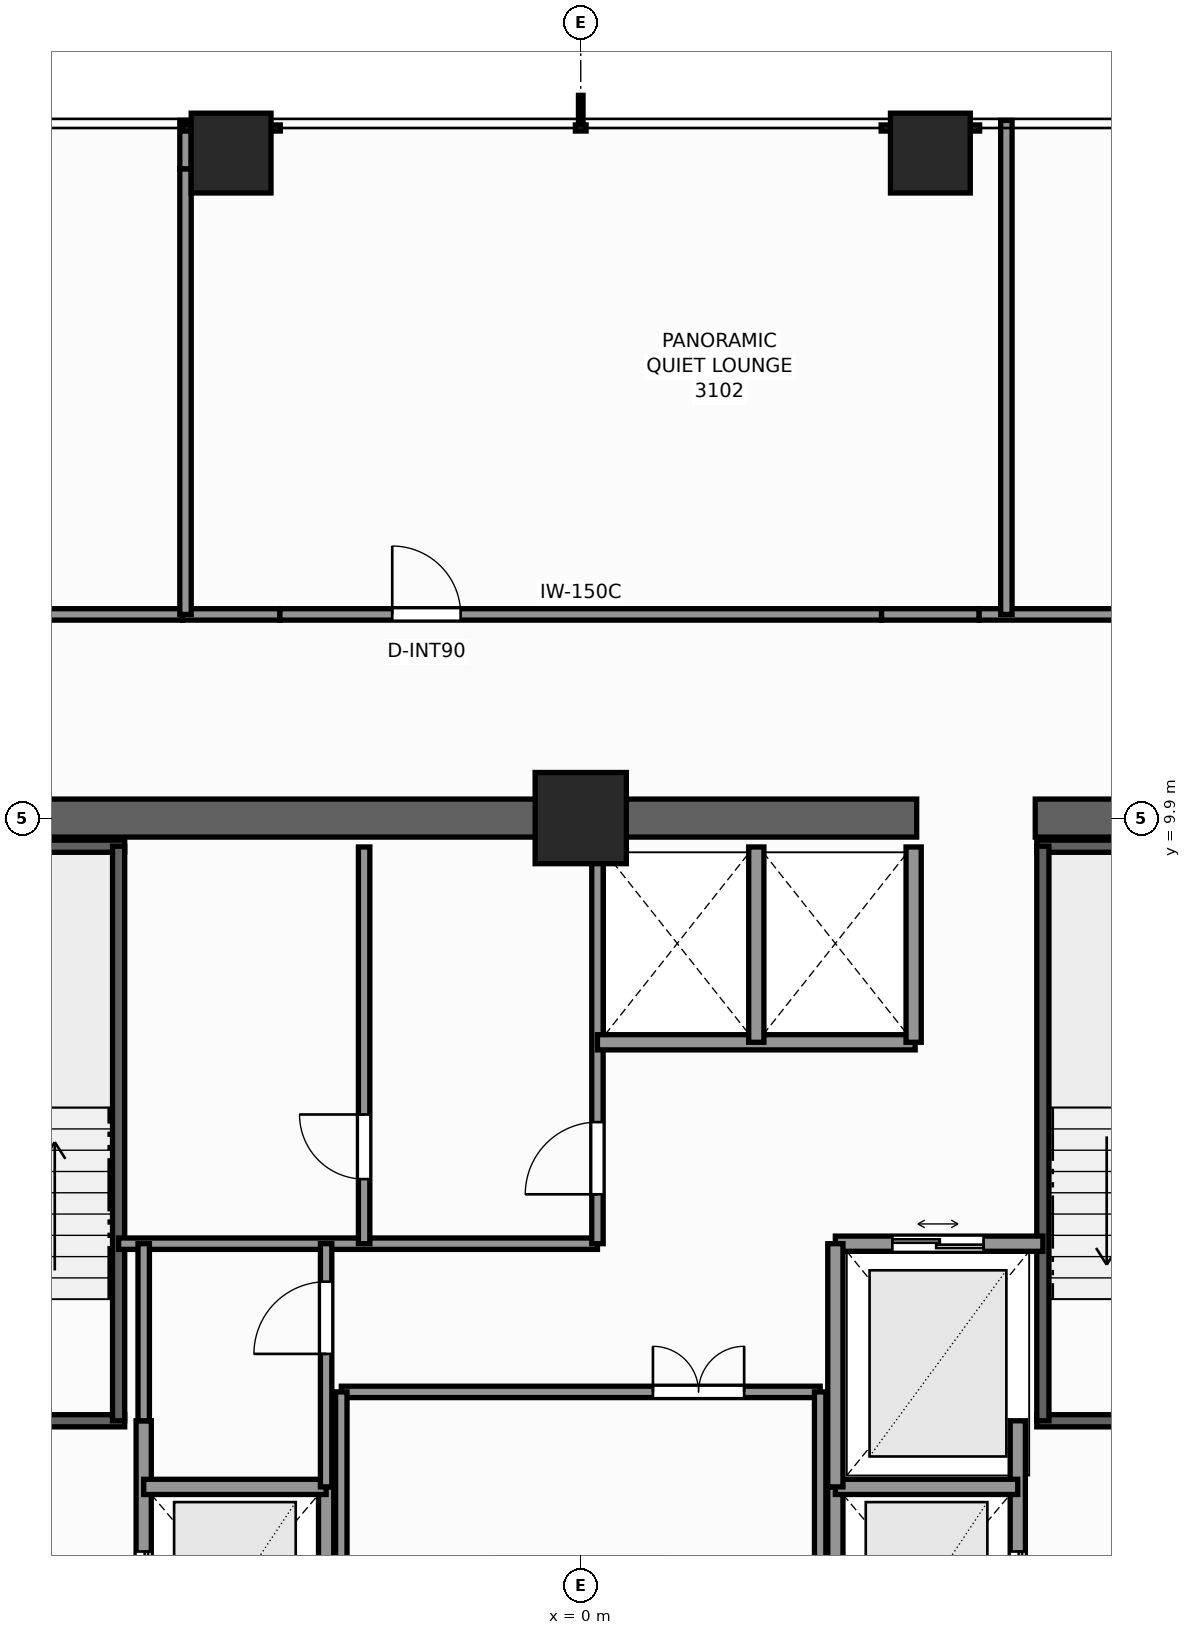
"""IFC4 building model, lengths in metres.
Left out: names, types, materials, properties, quantities, classifications, styles, units other than length and angle.
Written with IfcOpenShell. Run it as: python <this file> out.ifc"""

import sys

from ifc_helpers import new_model, si_unit, direction, frame, frame_2d, origin, origin_2d, place, context, subcontext, project, spatial, rectangle, extrude, element, fill, save


model = new_model("IFC4")
c1 = context("Model", 3, precision=1e-05, world=origin(), true_north=direction((0.0, 1.0)))
c2 = subcontext(c1, "Body", "Model", "MODEL_VIEW")
j1 = project(units=[si_unit("LENGTHUNIT", "METRE"), si_unit("PLANEANGLEUNIT", "RADIAN")], contexts=[c1])
p1 = place(None, origin())
s1 = spatial("IfcSite", under=j1, at=p1, CompositionType="ELEMENT")
p2 = place(p1, origin())
s2 = spatial("IfcBuilding", under=s1, at=p2, CompositionType="ELEMENT")
p3 = place(p2, frame((0.0, 0.0, 108.5)))
s3 = spatial("IfcBuildingStorey", under=s2, at=p3, CompositionType="ELEMENT", Elevation=108.5)
p4 = place(p3, frame((-10.15, 9.9, 0.0), z_axis=(0.0, 0.0, 1.0), x_axis=(1.0, 0.0, 0.0)))
e1 = element("IfcWall", 1, at=p4, inside=s3, PredefinedType="SHEAR", context=c2, shape_type="SweptSolid", body=[
    extrude(rectangle(XDim=14.57, YDim=0.5, at=frame_2d((7.285, 0.0))), origin(), (0.0, 0.0, 1.0), 3.3),
])
p5 = place(p3, frame((5.98, 9.9, 0.0), z_axis=(0.0, 0.0, 1.0), x_axis=(1.0, 0.0, 0.0)))
e2 = element("IfcWall", 2, at=p5, inside=s3, PredefinedType="SHEAR", context=c2, shape_type="SweptSolid", body=[
    extrude(rectangle(XDim=4.17, YDim=0.5, at=frame_2d((2.085, 0.0))), origin(), (0.0, 0.0, 1.0), 3.3),
])
p6 = place(p3, frame((0.0, 9.9, 0.0), z_axis=(0.0, 0.0, 1.0), x_axis=(1.0, 0.0, 0.0)))
e3 = element("IfcColumn", 3, at=p6, inside=s3, PredefinedType="COLUMN", context=c2, shape_type="SweptSolid", body=[
    extrude(rectangle(XDim=1.2, YDim=1.2, at=origin_2d()), origin(), (0.0, 0.0, 1.0), 3.3),
])
for number, where, z_axis, x_axis in (
    (4, (-4.6, 18.65, 0.0), (0.0, 0.0, 1.0), (1.0, 0.0, 0.0)),
    (5, (4.6, 18.65, 0.0), (0.0, 0.0, 1.0), (1.0, 0.0, 0.0)),
):
    element("IfcColumn", number, at=place(p3, frame(where, z_axis=z_axis, x_axis=x_axis)), inside=s3, PredefinedType="COLUMN", context=c2, shape_type="SweptSolid", body=[
        extrude(rectangle(XDim=1.05, YDim=1.05, at=origin_2d()), origin(), (0.0, 0.0, 1.0), 3.3),
    ])
p7 = place(p3, frame((-9.52, 1.97, 0.0), z_axis=(0.0, 0.0, 1.0), x_axis=(1.0, 0.0, 0.0)))
e6 = element("IfcWall", 6, at=p7, inside=s3, PredefinedType="SHEAR", context=c2, shape_type="SweptSolid", body=[
    extrude(rectangle(XDim=3.52, YDim=0.16, at=frame_2d((1.76, 0.0))), origin(), (0.0, 0.0, 1.0), 3.3),
])
p8 = place(p7, frame((1.15, 0.0, 0.0)))
e7 = element("IfcOpeningElement", 7, at=p8, cuts=e6, PredefinedType="OPENING", context=c2, shape_type="SweptSolid", body=[
    extrude(rectangle(XDim=1.1, YDim=2.2, at=frame_2d((0.55, 1.1))), frame((0.0, 0.09, 0.0), z_axis=(0.0, -1.0, 0.0), x_axis=(1.0, 0.0, 0.0)), (0.0, 0.0, 1.0), 0.18),
])
p9 = place(p3, frame((-9.52, 9.53, 0.0), z_axis=(0.0, 0.0, 1.0), x_axis=(1.0, 0.0, 0.0)))
e8 = element("IfcWall", 8, at=p9, inside=s3, PredefinedType="SHEAR", context=c2, shape_type="SweptSolid", body=[
    extrude(rectangle(XDim=3.52, YDim=0.16, at=frame_2d((1.76, 0.0))), origin(), (0.0, 0.0, 1.0), 3.3),
])
p10 = place(p3, frame((-6.08, 1.97, 0.0), z_axis=(0.0, 0.0, 1.0), x_axis=(0.0, 1.0, 0.0)))
e9 = element("IfcWall", 9, at=p10, inside=s3, PredefinedType="SHEAR", context=c2, shape_type="SweptSolid", body=[
    extrude(rectangle(XDim=7.56, YDim=0.16, at=frame_2d((3.78, 0.0))), origin(), (0.0, 0.0, 1.0), 3.3),
])
p11 = place(p3, frame((6.0, 1.97, 0.0), z_axis=(0.0, 0.0, 1.0), x_axis=(1.0, 0.0, 0.0)))
e10 = element("IfcWall", 10, at=p11, inside=s3, PredefinedType="SHEAR", context=c2, shape_type="SweptSolid", body=[
    extrude(rectangle(XDim=3.52, YDim=0.16, at=frame_2d((1.76, 0.0))), origin(), (0.0, 0.0, 1.0), 3.3),
])
p12 = place(p11, frame((1.15, 0.0, 0.0)))
e11 = element("IfcOpeningElement", 11, at=p12, cuts=e10, PredefinedType="OPENING", context=c2, shape_type="SweptSolid", body=[
    extrude(rectangle(XDim=1.1, YDim=2.2, at=frame_2d((0.55, 1.1))), frame((0.0, 0.09, 0.0), z_axis=(0.0, -1.0, 0.0), x_axis=(1.0, 0.0, 0.0)), (0.0, 0.0, 1.0), 0.18),
])
p13 = place(p3, frame((6.0, 9.53, 0.0), z_axis=(0.0, 0.0, 1.0), x_axis=(1.0, 0.0, 0.0)))
e12 = element("IfcWall", 12, at=p13, inside=s3, PredefinedType="SHEAR", context=c2, shape_type="SweptSolid", body=[
    extrude(rectangle(XDim=3.52, YDim=0.16, at=frame_2d((1.76, 0.0))), origin(), (0.0, 0.0, 1.0), 3.3),
])
p14 = place(p3, frame((6.08, 1.97, 0.0), z_axis=(0.0, 0.0, 1.0), x_axis=(0.0, 1.0, 0.0)))
e13 = element("IfcWall", 13, at=p14, inside=s3, PredefinedType="SHEAR", context=c2, shape_type="SweptSolid", body=[
    extrude(rectangle(XDim=7.56, YDim=0.16, at=frame_2d((3.78, 0.0))), origin(), (0.0, 0.0, 1.0), 3.3),
])
p15 = place(p3, frame((-5.75, -3.6, 0.0), z_axis=(0.0, 0.0, 1.0), x_axis=(0.0, 1.0, 0.0)))
e14 = element("IfcWall", 14, at=p15, inside=s3, PredefinedType="SOLIDWALL", context=c2, shape_type="SweptSolid", body=[
    extrude(rectangle(XDim=5.57, YDim=0.2, at=frame_2d((2.785, 0.0))), origin(), (0.0, 0.0, 1.0), 2.715),
])
p16 = place(p15, frame((2.75, 0.0, 0.0)))
e15 = element("IfcOpeningElement", 15, at=p16, cuts=e14, PredefinedType="OPENING", context=c2, shape_type="SweptSolid", body=[
    extrude(rectangle(XDim=1.1, YDim=2.2, at=frame_2d((0.55, 1.1))), frame((0.0, 0.11, 0.0), z_axis=(0.0, -1.0, 0.0), x_axis=(1.0, 0.0, 0.0)), (0.0, 0.0, 1.0), 0.22),
])
p17 = place(p3, frame((-3.35, -1.7, 0.0), z_axis=(0.0, 0.0, 1.0), x_axis=(0.0, 1.0, 0.0)))
e16 = element("IfcWall", 16, at=p17, inside=s3, PredefinedType="SOLIDWALL", context=c2, shape_type="SweptSolid", body=[
    extrude(rectangle(XDim=2.8, YDim=0.2, at=frame_2d((1.4, 0.0))), origin(), (0.0, 0.0, 1.0), 2.715),
])
p18 = place(p3, frame((-5.75, 1.1, 0.0), z_axis=(0.0, 0.0, 1.0), x_axis=(1.0, 0.0, 0.0)))
e17 = element("IfcWall", 17, at=p18, inside=s3, PredefinedType="SOLIDWALL", context=c2, shape_type="SweptSolid", body=[
    extrude(rectangle(XDim=2.4, YDim=0.2, at=frame_2d((1.2, 0.0))), origin(), (0.0, 0.0, 1.0), 3.08),
])
p19 = place(p3, frame((5.75, -3.6, 0.0), z_axis=(0.0, 0.0, 1.0), x_axis=(0.0, 1.0, 0.0)))
e18 = element("IfcWall", 18, at=p19, inside=s3, PredefinedType="SOLIDWALL", context=c2, shape_type="SweptSolid", body=[
    extrude(rectangle(XDim=5.57, YDim=0.2, at=frame_2d((2.785, 0.0))), origin(), (0.0, 0.0, 1.0), 2.715),
])
p20 = place(p19, frame((2.75, 0.0, 0.0)))
e19 = element("IfcOpeningElement", 19, at=p20, cuts=e18, PredefinedType="OPENING", context=c2, shape_type="SweptSolid", body=[
    extrude(rectangle(XDim=1.1, YDim=2.2, at=frame_2d((0.55, 1.1))), frame((0.0, 0.11, 0.0), z_axis=(0.0, -1.0, 0.0), x_axis=(1.0, 0.0, 0.0)), (0.0, 0.0, 1.0), 0.22),
])
p21 = place(p3, frame((3.35, -1.7, 0.0), z_axis=(0.0, 0.0, 1.0), x_axis=(0.0, 1.0, 0.0)))
e20 = element("IfcWall", 20, at=p21, inside=s3, PredefinedType="SOLIDWALL", context=c2, shape_type="SweptSolid", body=[
    extrude(rectangle(XDim=2.8, YDim=0.2, at=frame_2d((1.4, 0.0))), origin(), (0.0, 0.0, 1.0), 2.715),
])
p22 = place(p3, frame((3.35, 1.1, 0.0), z_axis=(0.0, 0.0, 1.0), x_axis=(1.0, 0.0, 0.0)))
e21 = element("IfcWall", 21, at=p22, inside=s3, PredefinedType="SOLIDWALL", context=c2, shape_type="SweptSolid", body=[
    extrude(rectangle(XDim=2.4, YDim=0.2, at=frame_2d((1.2, 0.0))), origin(), (0.0, 0.0, 1.0), 3.08),
])
p23 = place(p3, frame((3.35, 4.3, 0.0), z_axis=(0.0, 0.0, 1.0), x_axis=(1.0, 0.0, 0.0)))
e22 = element("IfcWall", 22, at=p23, inside=s3, PredefinedType="SOLIDWALL", context=c2, shape_type="SweptSolid", body=[
    extrude(rectangle(XDim=2.73, YDim=0.2, at=frame_2d((1.365, 0.0))), origin(), (0.0, 0.0, 1.0), 3.08),
])
p24 = place(p23, frame((0.75, 0.0, 0.0)))
e23 = element("IfcOpeningElement", 23, at=p24, cuts=e22, PredefinedType="OPENING", context=c2, shape_type="SweptSolid", body=[
    extrude(rectangle(XDim=1.2, YDim=2.25, at=frame_2d((0.6, 1.125))), frame((0.0, 0.11, 0.0), z_axis=(0.0, -1.0, 0.0), x_axis=(1.0, 0.0, 0.0)), (0.0, 0.0, 1.0), 0.22),
])
p25 = place(p3, frame((3.35, 1.1, 0.0), z_axis=(0.0, 0.0, 1.0), x_axis=(0.0, 1.0, 0.0)))
e24 = element("IfcWall", 24, at=p25, inside=s3, PredefinedType="SOLIDWALL", context=c2, shape_type="SweptSolid", body=[
    extrude(rectangle(XDim=3.2, YDim=0.2, at=frame_2d((1.6, 0.0))), origin(), (0.0, 0.0, 1.0), 2.715),
])
p26 = place(p3, frame((-6.08, 4.3, 0.0), z_axis=(0.0, 0.0, 1.0), x_axis=(1.0, 0.0, 0.0)))
e25 = element("IfcWall", 25, at=p26, inside=s3, PredefinedType="PARTITIONING", context=c2, shape_type="SweptSolid", body=[
    extrude(rectangle(XDim=6.3, YDim=0.15, at=frame_2d((3.15, 0.0))), origin(), (0.0, 0.0, 1.0), 3.08),
])
p27 = place(p3, frame((0.22, 4.3, 0.0), z_axis=(0.0, 0.0, 1.0), x_axis=(0.0, 1.0, 0.0)))
e26 = element("IfcWall", 26, at=p27, inside=s3, PredefinedType="PARTITIONING", context=c2, shape_type="SweptSolid", body=[
    extrude(rectangle(XDim=5.22, YDim=0.15, at=frame_2d((2.61, 0.0))), origin(), (0.0, 0.0, 1.0), 3.08),
])
p28 = place(p27, frame((0.65, 0.0, 0.0)))
e27 = element("IfcOpeningElement", 27, at=p28, cuts=e26, PredefinedType="OPENING", context=c2, shape_type="SweptSolid", body=[
    extrude(rectangle(XDim=0.95, YDim=2.06, at=frame_2d((0.475, 1.03))), frame((0.0, 0.085, 0.0), z_axis=(0.0, -1.0, 0.0), x_axis=(1.0, 0.0, 0.0)), (0.0, 0.0, 1.0), 0.17),
])
p29 = place(p3, frame((-2.85, 4.3, 0.0), z_axis=(0.0, 0.0, 1.0), x_axis=(0.0, 1.0, 0.0)))
e28 = element("IfcWall", 28, at=p29, inside=s3, PredefinedType="PARTITIONING", context=c2, shape_type="SweptSolid", body=[
    extrude(rectangle(XDim=5.22, YDim=0.15, at=frame_2d((2.61, 0.0))), origin(), (0.0, 0.0, 1.0), 3.08),
])
p30 = place(p29, frame((0.85, 0.0, 0.0)))
e29 = element("IfcOpeningElement", 29, at=p30, cuts=e28, PredefinedType="OPENING", context=c2, shape_type="SweptSolid", body=[
    extrude(rectangle(XDim=0.85, YDim=2.03, at=frame_2d((0.425, 1.015))), frame((0.0, 0.085, 0.0), z_axis=(0.0, -1.0, 0.0), x_axis=(1.0, 0.0, 0.0)), (0.0, 0.0, 1.0), 0.17),
])
p31 = place(p3, frame((0.22, 6.95, 0.0), z_axis=(0.0, 0.0, 1.0), x_axis=(1.0, 0.0, 0.0)))
e30 = element("IfcWall", 30, at=p31, inside=s3, PredefinedType="SOLIDWALL", context=c2, shape_type="SweptSolid", body=[
    extrude(rectangle(XDim=4.18, YDim=0.2, at=frame_2d((2.09, 0.0))), origin(), (0.0, 0.0, 1.0), 3.08),
])
for number, where, z_axis, x_axis in (
    (31, (4.38, 6.95, 0.0), (0.0, 0.0, 1.0), (0.0, 1.0, 0.0)),
    (32, (2.31, 6.95, 0.0), (0.0, 0.0, 1.0), (0.0, 1.0, 0.0)),
):
    element("IfcWall", number, at=place(p3, frame(where, z_axis=z_axis, x_axis=x_axis)), inside=s3, PredefinedType="SOLIDWALL", context=c2, shape_type="SweptSolid", body=[
        extrude(rectangle(XDim=2.57, YDim=0.2, at=frame_2d((1.285, 0.0))), origin(), (0.0, 0.0, 1.0), 3.08),
    ])
p32 = place(p3, frame((-3.15, 2.35, 0.0), z_axis=(0.0, 0.0, 1.0), x_axis=(1.0, 0.0, 0.0)))
e33 = element("IfcWall", 33, at=p32, inside=s3, PredefinedType="PARTITIONING", context=c2, shape_type="SweptSolid", body=[
    extrude(rectangle(XDim=6.3, YDim=0.15, at=frame_2d((3.15, 0.0))), origin(), (0.0, 0.0, 1.0), 2.715),
])
p33 = place(p32, frame((4.1, 0.0, 0.0)))
e34 = element("IfcOpeningElement", 34, at=p33, cuts=e33, PredefinedType="OPENING", context=c2, shape_type="SweptSolid", body=[
    extrude(rectangle(XDim=1.2, YDim=2.2, at=frame_2d((0.6, 1.1))), frame((0.0, 0.085, 0.0), z_axis=(0.0, -1.0, 0.0), x_axis=(1.0, 0.0, 0.0)), (0.0, 0.0, 1.0), 0.17),
])
for number, where, z_axis, x_axis in (
    (35, (-3.15, -1.95, 0.0), (0.0, 0.0, 1.0), (0.0, 1.0, 0.0)),
    (36, (3.15, -1.95, 0.0), (0.0, 0.0, 1.0), (0.0, 1.0, 0.0)),
):
    element("IfcWall", number, at=place(p3, frame(where, z_axis=z_axis, x_axis=x_axis)), inside=s3, PredefinedType="PARTITIONING", context=c2, shape_type="SweptSolid", body=[
        extrude(rectangle(XDim=4.3, YDim=0.15, at=frame_2d((2.15, 0.0))), origin(), (0.0, 0.0, 1.0), 2.715),
    ])
p34 = place(p3, frame((-3.35, 1.1, 0.0), z_axis=(0.0, 0.0, 1.0), x_axis=(0.0, 1.0, 0.0)))
e37 = element("IfcWall", 37, at=p34, inside=s3, PredefinedType="PARTITIONING", context=c2, shape_type="SweptSolid", body=[
    extrude(rectangle(XDim=3.2, YDim=0.15, at=frame_2d((1.6, 0.0))), origin(), (0.0, 0.0, 1.0), 2.715),
])
p35 = place(p34, frame((1.75, 0.0, 0.0)))
e38 = element("IfcOpeningElement", 38, at=p35, cuts=e37, PredefinedType="OPENING", context=c2, shape_type="SweptSolid", body=[
    extrude(rectangle(XDim=0.95, YDim=2.06, at=frame_2d((0.475, 1.03))), frame((0.0, 0.085, 0.0), z_axis=(0.0, -1.0, 0.0), x_axis=(1.0, 0.0, 0.0)), (0.0, 0.0, 1.0), 0.17),
])
p36 = place(p3, frame((-5.75, 1.97, 0.0), z_axis=(0.0, 0.0, 1.0), x_axis=(0.0, 1.0, 0.0)))
e39 = element("IfcWall", 39, at=p36, inside=s3, PredefinedType="PARTITIONING", context=c2, shape_type="SweptSolid", body=[
    extrude(rectangle(XDim=2.33, YDim=0.15, at=frame_2d((1.165, 0.0))), origin(), (0.0, 0.0, 1.0), 2.715),
])
p37 = place(p3, frame((-10.016, 12.58, 0.0), z_axis=(0.0, 0.0, 1.0), x_axis=(1.0, 0.0, 0.0)))
e40 = element("IfcWall", 40, at=p37, inside=s3, PredefinedType="PARTITIONING", context=c2, shape_type="SweptSolid", body=[
    extrude(rectangle(XDim=4.774, YDim=0.15, at=frame_2d((2.387, 0.0))), origin(), (0.0, 0.0, 1.0), 3.08),
])
p38 = place(p37, frame((2.031, 0.0, 0.0)))
e41 = element("IfcOpeningElement", 41, at=p38, cuts=e40, PredefinedType="OPENING", context=c2, shape_type="SweptSolid", body=[
    extrude(rectangle(XDim=0.9, YDim=2.06, at=frame_2d((0.45, 1.03))), frame((0.0, 0.085, 0.0), z_axis=(0.0, -1.0, 0.0), x_axis=(1.0, 0.0, 0.0)), (0.0, 0.0, 1.0), 0.17),
])
p39 = place(p3, frame((-5.242, 12.58, 0.0), z_axis=(0.0, 0.0, 1.0), x_axis=(1.0, 0.0, 0.0)))
e42 = element("IfcWall", 42, at=p39, inside=s3, PredefinedType="PARTITIONING", context=c2, shape_type="SweptSolid", body=[
    extrude(rectangle(XDim=1.284, YDim=0.15, at=frame_2d((0.642, 0.0))), origin(), (0.0, 0.0, 1.0), 1.265),
])
p40 = place(p3, frame((-3.958, 12.58, 0.0), z_axis=(0.0, 0.0, 1.0), x_axis=(1.0, 0.0, 0.0)))
e43 = element("IfcWall", 43, at=p40, inside=s3, PredefinedType="PARTITIONING", context=c2, shape_type="SweptSolid", body=[
    extrude(rectangle(XDim=7.916, YDim=0.15, at=frame_2d((3.958, 0.0))), origin(), (0.0, 0.0, 1.0), 2.369),
])
p41 = place(p40, frame((1.478, 0.0, 0.0)))
e44 = element("IfcOpeningElement", 44, at=p41, cuts=e43, PredefinedType="OPENING", context=c2, shape_type="SweptSolid", body=[
    extrude(rectangle(XDim=0.9, YDim=2.06, at=frame_2d((0.45, 1.03))), frame((0.0, 0.085, 0.0), z_axis=(0.0, -1.0, 0.0), x_axis=(1.0, 0.0, 0.0)), (0.0, 0.0, 1.0), 0.17),
])
p42 = place(p3, frame((3.958, 12.58, 0.0), z_axis=(0.0, 0.0, 1.0), x_axis=(1.0, 0.0, 0.0)))
e45 = element("IfcWall", 45, at=p42, inside=s3, PredefinedType="PARTITIONING", context=c2, shape_type="SweptSolid", body=[
    extrude(rectangle(XDim=1.284, YDim=0.15, at=frame_2d((0.642, 0.0))), origin(), (0.0, 0.0, 1.0), 1.265),
])
p43 = place(p3, frame((5.242, 12.58, 0.0), z_axis=(0.0, 0.0, 1.0), x_axis=(1.0, 0.0, 0.0)))
e46 = element("IfcWall", 46, at=p43, inside=s3, PredefinedType="PARTITIONING", context=c2, shape_type="SweptSolid", body=[
    extrude(rectangle(XDim=4.774, YDim=0.15, at=frame_2d((2.387, 0.0))), origin(), (0.0, 0.0, 1.0), 3.08),
])
p44 = place(p43, frame((2.159, 0.0, 0.0)))
e47 = element("IfcOpeningElement", 47, at=p44, cuts=e46, PredefinedType="OPENING", context=c2, shape_type="SweptSolid", body=[
    extrude(rectangle(XDim=0.9, YDim=2.06, at=frame_2d((0.45, 1.03))), frame((0.0, 0.085, 0.0), z_axis=(0.0, -1.0, 0.0), x_axis=(1.0, 0.0, 0.0)), (0.0, 0.0, 1.0), 0.17),
])
p45 = place(p3, frame((-5.2, 12.58, 0.0), z_axis=(0.0, 0.0, 1.0), x_axis=(0.0, 1.0, 0.0)))
e48 = element("IfcWall", 48, at=p45, inside=s3, PredefinedType="PARTITIONING", context=c2, shape_type="SweptSolid", body=[
    extrude(rectangle(XDim=5.864, YDim=0.15, at=frame_2d((2.932, 0.0))), origin(), (0.0, 0.0, 1.0), 1.265),
])
p46 = place(p3, frame((-5.2, 18.444, 0.0), z_axis=(0.0, 0.0, 1.0), x_axis=(0.0, 1.0, 0.0)))
e49 = element("IfcWall", 49, at=p46, inside=s3, PredefinedType="PARTITIONING", context=c2, shape_type="SweptSolid", body=[
    extrude(rectangle(XDim=0.636, YDim=0.15, at=frame_2d((0.318, 0.0))), origin(), (0.0, 0.0, 1.0), 2.449),
])
p47 = place(p3, frame((5.6, 12.58, 0.0), z_axis=(0.0, 0.0, 1.0), x_axis=(0.0, 1.0, 0.0)))
e50 = element("IfcWall", 50, at=p47, inside=s3, PredefinedType="PARTITIONING", context=c2, shape_type="SweptSolid", body=[
    extrude(rectangle(XDim=6.5, YDim=0.15, at=frame_2d((3.25, 0.0))), origin(), (0.0, 0.0, 1.0), 2.449),
])
p48 = place(p16, origin())
e51 = element("IfcDoor", 51, at=p48, inside=s3, OperationType="DOUBLE_DOOR_SLIDING", PredefinedType="DOOR", context=c2, shape_type="SweptSolid", body=[
    extrude(rectangle(XDim=1.1, YDim=2.2, at=frame_2d((0.55, 1.1))), frame((0.0, 0.025, 0.0), z_axis=(0.0, -1.0, 0.0), x_axis=(1.0, 0.0, 0.0)), (0.0, 0.0, 1.0), 0.05),
])
fill(e15, e51)
p49 = place(p20, origin())
e52 = element("IfcDoor", 52, at=p49, inside=s3, OperationType="DOUBLE_DOOR_SLIDING", PredefinedType="DOOR", context=c2, shape_type="SweptSolid", body=[
    extrude(rectangle(XDim=1.1, YDim=2.2, at=frame_2d((0.55, 1.1))), frame((0.0, 0.025, 0.0), z_axis=(0.0, -1.0, 0.0), x_axis=(1.0, 0.0, 0.0)), (0.0, 0.0, 1.0), 0.05),
])
fill(e19, e52)
p50 = place(p24, origin())
e53 = element("IfcDoor", 53, at=p50, inside=s3, OperationType="DOUBLE_DOOR_SLIDING", PredefinedType="DOOR", context=c2, shape_type="SweptSolid", body=[
    extrude(rectangle(XDim=1.2, YDim=2.25, at=frame_2d((0.6, 1.125))), frame((0.0, 0.025, 0.0), z_axis=(0.0, -1.0, 0.0), x_axis=(1.0, 0.0, 0.0)), (0.0, 0.0, 1.0), 0.05),
])
fill(e23, e53)
p51 = place(p28, origin())
e54 = element("IfcDoor", 54, at=p51, inside=s3, OperationType="SINGLE_SWING_LEFT", PredefinedType="DOOR", context=c2, shape_type="SweptSolid", body=[
    extrude(rectangle(XDim=0.95, YDim=2.06, at=frame_2d((0.475, 1.03))), frame((0.0, 0.025, 0.0), z_axis=(0.0, -1.0, 0.0), x_axis=(1.0, 0.0, 0.0)), (0.0, 0.0, 1.0), 0.05),
])
fill(e27, e54)
p52 = place(p30, origin())
e55 = element("IfcDoor", 55, at=p52, inside=s3, OperationType="SINGLE_SWING_RIGHT", PredefinedType="DOOR", context=c2, shape_type="SweptSolid", body=[
    extrude(rectangle(XDim=0.85, YDim=2.03, at=frame_2d((0.425, 1.015))), frame((0.0, 0.025, 0.0), z_axis=(0.0, -1.0, 0.0), x_axis=(1.0, 0.0, 0.0)), (0.0, 0.0, 1.0), 0.05),
])
fill(e29, e55)
p53 = place(p33, origin())
e56 = element("IfcDoor", 56, at=p53, inside=s3, OperationType="DOUBLE_DOOR_SINGLE_SWING", PredefinedType="DOOR", context=c2, shape_type="SweptSolid", body=[
    extrude(rectangle(XDim=1.2, YDim=2.2, at=frame_2d((0.6, 1.1))), frame((0.0, 0.025, 0.0), z_axis=(0.0, -1.0, 0.0), x_axis=(1.0, 0.0, 0.0)), (0.0, 0.0, 1.0), 0.05),
])
fill(e34, e56)
p54 = place(p35, origin())
e57 = element("IfcDoor", 57, at=p54, inside=s3, OperationType="SINGLE_SWING_LEFT", PredefinedType="DOOR", context=c2, shape_type="SweptSolid", body=[
    extrude(rectangle(XDim=0.95, YDim=2.06, at=frame_2d((0.475, 1.03))), frame((0.0, 0.025, 0.0), z_axis=(0.0, -1.0, 0.0), x_axis=(1.0, 0.0, 0.0)), (0.0, 0.0, 1.0), 0.05),
])
fill(e38, e57)
p55 = place(p41, origin())
e58 = element("IfcDoor", 58, at=p55, inside=s3, OperationType="SINGLE_SWING_LEFT", PredefinedType="DOOR", context=c2, shape_type="SweptSolid", body=[
    extrude(rectangle(XDim=0.9, YDim=2.06, at=frame_2d((0.45, 1.03))), frame((0.0, 0.025, 0.0), z_axis=(0.0, -1.0, 0.0), x_axis=(1.0, 0.0, 0.0)), (0.0, 0.0, 1.0), 0.05),
])
fill(e44, e58)
save(model, sys.argv[1])
